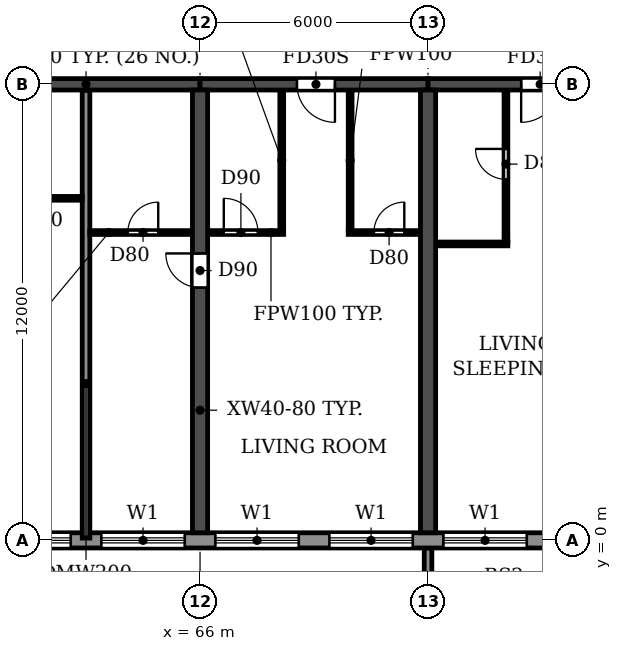
"""IFC4 building model, lengths in metres.
Left out: names, types, materials, properties, quantities, classifications, styles, units other than length and angle.
Written with IfcOpenShell. Run it as: python <this file> out.ifc"""

import sys

from ifc_helpers import new_model, si_unit, direction, frame, frame_2d, origin, place, context, subcontext, project, spatial, polyline, rectangle, outline, extrude, source, transform, mapped, element, fill, save


model = new_model("IFC4")
c1 = context("Model", 3, precision=1e-05, world=origin(), true_north=direction((0.0, 1.0)))
c2 = subcontext(c1, "Body", "Model", "MODEL_VIEW")
j1 = project(units=[si_unit("LENGTHUNIT", "METRE"), si_unit("PLANEANGLEUNIT", "RADIAN")], contexts=[c1])
p1 = place(None, origin())
s1 = spatial("IfcSite", under=j1, at=p1, CompositionType="ELEMENT")
p2 = place(p1, origin())
s2 = spatial("IfcBuilding", under=s1, at=p2, CompositionType="ELEMENT")
p3 = place(p2, frame((0.0, 0.0, 63.0)))
s3 = spatial("IfcBuildingStorey", under=s2, at=p3, CompositionType="ELEMENT", Elevation=63.0)
p4 = place(p3, frame((66.0, 0.2, 0.0), z_axis=(0.0, 0.0, 1.0), x_axis=(0.0, 1.0, 0.0)))
e1 = element("IfcWall", 1, at=p4, inside=s3, PredefinedType="SHEAR", context=c2, shape_type="SweptSolid", body=[
    extrude(rectangle(XDim=11.65, YDim=0.4, at=frame_2d((5.825, 0.0))), origin(), (0.0, 0.0, 1.0), 2.95),
])
p5 = place(p4, frame((6.45, 0.0, 0.0)))
e2 = element("IfcOpeningElement", 2, at=p5, cuts=e1, PredefinedType="OPENING", context=c2, shape_type="SweptSolid", body=[
    extrude(rectangle(XDim=0.9, YDim=2.1, at=frame_2d((0.45, 1.05))), frame((0.0, 0.21, 0.0), z_axis=(0.0, -1.0, 0.0), x_axis=(1.0, 0.0, 0.0)), (0.0, 0.0, 1.0), 0.42),
])
p6 = place(p3, frame((72.0, 0.2, 0.0), z_axis=(0.0, 0.0, 1.0), x_axis=(0.0, 1.0, 0.0)))
e3 = element("IfcWall", 3, at=p6, inside=s3, PredefinedType="SHEAR", context=c2, shape_type="SweptSolid", body=[
    extrude(rectangle(XDim=11.65, YDim=0.4, at=frame_2d((5.825, 0.0))), origin(), (0.0, 0.0, 1.0), 2.95),
])
p7 = place(p3, frame((60.0, 12.0, 0.0), z_axis=(0.0, 0.0, 1.0), x_axis=(1.0, 0.0, 0.0)))
e4 = element("IfcWall", 4, at=p7, inside=s3, PredefinedType="SHEAR", context=c2, shape_type="SweptSolid", body=[
    extrude(rectangle(XDim=6.0, YDim=0.3, at=frame_2d((3.0, 0.0))), origin(), (0.0, 0.0, 1.0), 2.35),
])
p8 = place(p3, frame((66.0, 12.0, 0.0), z_axis=(0.0, 0.0, 1.0), x_axis=(1.0, 0.0, 0.0)))
e5 = element("IfcWall", 5, at=p8, inside=s3, PredefinedType="SHEAR", context=c2, shape_type="SweptSolid", body=[
    extrude(rectangle(XDim=6.0, YDim=0.3, at=frame_2d((3.0, 0.0))), origin(), (0.0, 0.0, 1.0), 2.35),
])
p9 = place(p8, frame((2.55, 0.0, 0.0)))
e6 = element("IfcOpeningElement", 6, at=p9, cuts=e5, PredefinedType="OPENING", context=c2, shape_type="SweptSolid", body=[
    extrude(rectangle(XDim=1.0, YDim=2.1, at=frame_2d((0.5, 1.05))), frame((0.0, 0.16, 0.0), z_axis=(0.0, -1.0, 0.0), x_axis=(1.0, 0.0, 0.0)), (0.0, 0.0, 1.0), 0.32),
])
p10 = place(p3, frame((72.0, 12.0, 0.0), z_axis=(0.0, 0.0, 1.0), x_axis=(1.0, 0.0, 0.0)))
e7 = element("IfcWall", 7, at=p10, inside=s3, PredefinedType="SHEAR", context=c2, shape_type="SweptSolid", body=[
    extrude(rectangle(XDim=6.0, YDim=0.3, at=frame_2d((3.0, 0.0))), origin(), (0.0, 0.0, 1.0), 2.35),
])
p11 = place(p10, frame((2.45, 0.0, 0.0)))
e8 = element("IfcOpeningElement", 8, at=p11, cuts=e7, PredefinedType="OPENING", context=c2, shape_type="SweptSolid", body=[
    extrude(rectangle(XDim=1.0, YDim=2.1, at=frame_2d((0.5, 1.05))), frame((0.0, 0.16, 0.0), z_axis=(0.0, -1.0, 0.0), x_axis=(1.0, 0.0, 0.0)), (0.0, 0.0, 1.0), 0.32),
])
p12 = place(p3, frame((10.683, 0.0, 0.0), z_axis=(0.0, 0.0, 1.0), x_axis=(1.0, 0.0, 0.0)))
e9 = element("IfcWall", 9, at=p12, inside=s3, PredefinedType="STANDARD", context=c2, shape_type="SweptSolid", body=[
    extrude(rectangle(XDim=80.634, YDim=0.4, at=frame_2d((40.317, 0.0))), origin(), (0.0, 0.0, 1.0), 2.95),
])
p13 = place(p12, frame((1.717, 0.0, 0.9)))
e10 = element("IfcOpeningElement", 10, at=p13, cuts=e9, PredefinedType="OPENING", context=c2, shape_type="SweptSolid", body=[
    extrude(rectangle(XDim=2.2, YDim=1.5, at=frame_2d((1.1, 0.75))), frame((0.0, 0.21, 0.0), z_axis=(0.0, -1.0, 0.0), x_axis=(1.0, 0.0, 0.0)), (0.0, 0.0, 1.0), 0.42),
])
p14 = place(p12, frame((4.917, 0.0, 0.0)))
e11 = element("IfcOpeningElement", 11, at=p14, cuts=e9, PredefinedType="OPENING", context=c2, shape_type="SweptSolid", body=[
    extrude(rectangle(XDim=1.8, YDim=2.4, at=frame_2d((0.9, 1.2))), frame((0.0, 0.21, 0.0), z_axis=(0.0, -1.0, 0.0), x_axis=(1.0, 0.0, 0.0)), (0.0, 0.0, 1.0), 0.42),
])
p15 = place(p12, frame((7.717, 0.0, 0.9)))
e12 = element("IfcOpeningElement", 12, at=p15, cuts=e9, PredefinedType="OPENING", context=c2, shape_type="SweptSolid", body=[
    extrude(rectangle(XDim=2.2, YDim=1.5, at=frame_2d((1.1, 0.75))), frame((0.0, 0.21, 0.0), z_axis=(0.0, -1.0, 0.0), x_axis=(1.0, 0.0, 0.0)), (0.0, 0.0, 1.0), 0.42),
])
p16 = place(p12, frame((10.717, 0.0, 0.9)))
e13 = element("IfcOpeningElement", 13, at=p16, cuts=e9, PredefinedType="OPENING", context=c2, shape_type="SweptSolid", body=[
    extrude(rectangle(XDim=2.2, YDim=1.5, at=frame_2d((1.1, 0.75))), frame((0.0, 0.21, 0.0), z_axis=(0.0, -1.0, 0.0), x_axis=(1.0, 0.0, 0.0)), (0.0, 0.0, 1.0), 0.42),
])
p17 = place(p12, frame((13.717, 0.0, 0.9)))
e14 = element("IfcOpeningElement", 14, at=p17, cuts=e9, PredefinedType="OPENING", context=c2, shape_type="SweptSolid", body=[
    extrude(rectangle(XDim=2.2, YDim=1.5, at=frame_2d((1.1, 0.75))), frame((0.0, 0.21, 0.0), z_axis=(0.0, -1.0, 0.0), x_axis=(1.0, 0.0, 0.0)), (0.0, 0.0, 1.0), 0.42),
])
p18 = place(p12, frame((16.917, 0.0, 0.0)))
e15 = element("IfcOpeningElement", 15, at=p18, cuts=e9, PredefinedType="OPENING", context=c2, shape_type="SweptSolid", body=[
    extrude(rectangle(XDim=1.8, YDim=2.4, at=frame_2d((0.9, 1.2))), frame((0.0, 0.21, 0.0), z_axis=(0.0, -1.0, 0.0), x_axis=(1.0, 0.0, 0.0)), (0.0, 0.0, 1.0), 0.42),
])
p19 = place(p12, frame((19.717, 0.0, 0.9)))
e16 = element("IfcOpeningElement", 16, at=p19, cuts=e9, PredefinedType="OPENING", context=c2, shape_type="SweptSolid", body=[
    extrude(rectangle(XDim=2.2, YDim=1.5, at=frame_2d((1.1, 0.75))), frame((0.0, 0.21, 0.0), z_axis=(0.0, -1.0, 0.0), x_axis=(1.0, 0.0, 0.0)), (0.0, 0.0, 1.0), 0.42),
])
p20 = place(p12, frame((22.717, 0.0, 0.9)))
e17 = element("IfcOpeningElement", 17, at=p20, cuts=e9, PredefinedType="OPENING", context=c2, shape_type="SweptSolid", body=[
    extrude(rectangle(XDim=2.2, YDim=1.5, at=frame_2d((1.1, 0.75))), frame((0.0, 0.21, 0.0), z_axis=(0.0, -1.0, 0.0), x_axis=(1.0, 0.0, 0.0)), (0.0, 0.0, 1.0), 0.42),
])
p21 = place(p12, frame((25.917, 0.0, 0.0)))
e18 = element("IfcOpeningElement", 18, at=p21, cuts=e9, PredefinedType="OPENING", context=c2, shape_type="SweptSolid", body=[
    extrude(rectangle(XDim=1.8, YDim=2.4, at=frame_2d((0.9, 1.2))), frame((0.0, 0.21, 0.0), z_axis=(0.0, -1.0, 0.0), x_axis=(1.0, 0.0, 0.0)), (0.0, 0.0, 1.0), 0.42),
])
p22 = place(p12, frame((28.717, 0.0, 0.9)))
e19 = element("IfcOpeningElement", 19, at=p22, cuts=e9, PredefinedType="OPENING", context=c2, shape_type="SweptSolid", body=[
    extrude(rectangle(XDim=2.2, YDim=1.5, at=frame_2d((1.1, 0.75))), frame((0.0, 0.21, 0.0), z_axis=(0.0, -1.0, 0.0), x_axis=(1.0, 0.0, 0.0)), (0.0, 0.0, 1.0), 0.42),
])
p23 = place(p12, frame((31.717, 0.0, 0.9)))
e20 = element("IfcOpeningElement", 20, at=p23, cuts=e9, PredefinedType="OPENING", context=c2, shape_type="SweptSolid", body=[
    extrude(rectangle(XDim=2.2, YDim=1.5, at=frame_2d((1.1, 0.75))), frame((0.0, 0.21, 0.0), z_axis=(0.0, -1.0, 0.0), x_axis=(1.0, 0.0, 0.0)), (0.0, 0.0, 1.0), 0.42),
])
p24 = place(p12, frame((34.717, 0.0, 0.9)))
e21 = element("IfcOpeningElement", 21, at=p24, cuts=e9, PredefinedType="OPENING", context=c2, shape_type="SweptSolid", body=[
    extrude(rectangle(XDim=2.2, YDim=1.5, at=frame_2d((1.1, 0.75))), frame((0.0, 0.21, 0.0), z_axis=(0.0, -1.0, 0.0), x_axis=(1.0, 0.0, 0.0)), (0.0, 0.0, 1.0), 0.42),
])
p25 = place(p12, frame((37.717, 0.0, 0.9)))
e22 = element("IfcOpeningElement", 22, at=p25, cuts=e9, PredefinedType="OPENING", context=c2, shape_type="SweptSolid", body=[
    extrude(rectangle(XDim=2.2, YDim=1.5, at=frame_2d((1.1, 0.75))), frame((0.0, 0.21, 0.0), z_axis=(0.0, -1.0, 0.0), x_axis=(1.0, 0.0, 0.0)), (0.0, 0.0, 1.0), 0.42),
])
p26 = place(p12, frame((40.917, 0.0, 0.0)))
e23 = element("IfcOpeningElement", 23, at=p26, cuts=e9, PredefinedType="OPENING", context=c2, shape_type="SweptSolid", body=[
    extrude(rectangle(XDim=1.8, YDim=2.4, at=frame_2d((0.9, 1.2))), frame((0.0, 0.21, 0.0), z_axis=(0.0, -1.0, 0.0), x_axis=(1.0, 0.0, 0.0)), (0.0, 0.0, 1.0), 0.42),
])
p27 = place(p12, frame((43.717, 0.0, 0.9)))
e24 = element("IfcOpeningElement", 24, at=p27, cuts=e9, PredefinedType="OPENING", context=c2, shape_type="SweptSolid", body=[
    extrude(rectangle(XDim=2.2, YDim=1.5, at=frame_2d((1.1, 0.75))), frame((0.0, 0.21, 0.0), z_axis=(0.0, -1.0, 0.0), x_axis=(1.0, 0.0, 0.0)), (0.0, 0.0, 1.0), 0.42),
])
p28 = place(p12, frame((46.717, 0.0, 0.9)))
e25 = element("IfcOpeningElement", 25, at=p28, cuts=e9, PredefinedType="OPENING", context=c2, shape_type="SweptSolid", body=[
    extrude(rectangle(XDim=2.2, YDim=1.5, at=frame_2d((1.1, 0.75))), frame((0.0, 0.21, 0.0), z_axis=(0.0, -1.0, 0.0), x_axis=(1.0, 0.0, 0.0)), (0.0, 0.0, 1.0), 0.42),
])
p29 = place(p12, frame((49.717, 0.0, 0.9)))
e26 = element("IfcOpeningElement", 26, at=p29, cuts=e9, PredefinedType="OPENING", context=c2, shape_type="SweptSolid", body=[
    extrude(rectangle(XDim=2.2, YDim=1.5, at=frame_2d((1.1, 0.75))), frame((0.0, 0.21, 0.0), z_axis=(0.0, -1.0, 0.0), x_axis=(1.0, 0.0, 0.0)), (0.0, 0.0, 1.0), 0.42),
])
p30 = place(p12, frame((52.717, 0.0, 0.9)))
e27 = element("IfcOpeningElement", 27, at=p30, cuts=e9, PredefinedType="OPENING", context=c2, shape_type="SweptSolid", body=[
    extrude(rectangle(XDim=2.2, YDim=1.5, at=frame_2d((1.1, 0.75))), frame((0.0, 0.21, 0.0), z_axis=(0.0, -1.0, 0.0), x_axis=(1.0, 0.0, 0.0)), (0.0, 0.0, 1.0), 0.42),
])
p31 = place(p12, frame((55.717, 0.0, 0.9)))
e28 = element("IfcOpeningElement", 28, at=p31, cuts=e9, PredefinedType="OPENING", context=c2, shape_type="SweptSolid", body=[
    extrude(rectangle(XDim=2.2, YDim=1.5, at=frame_2d((1.1, 0.75))), frame((0.0, 0.21, 0.0), z_axis=(0.0, -1.0, 0.0), x_axis=(1.0, 0.0, 0.0)), (0.0, 0.0, 1.0), 0.42),
])
p32 = place(p12, frame((58.717, 0.0, 0.9)))
e29 = element("IfcOpeningElement", 29, at=p32, cuts=e9, PredefinedType="OPENING", context=c2, shape_type="SweptSolid", body=[
    extrude(rectangle(XDim=2.2, YDim=1.5, at=frame_2d((1.1, 0.75))), frame((0.0, 0.21, 0.0), z_axis=(0.0, -1.0, 0.0), x_axis=(1.0, 0.0, 0.0)), (0.0, 0.0, 1.0), 0.42),
])
p33 = place(p12, frame((61.717, 0.0, 0.9)))
e30 = element("IfcOpeningElement", 30, at=p33, cuts=e9, PredefinedType="OPENING", context=c2, shape_type="SweptSolid", body=[
    extrude(rectangle(XDim=2.2, YDim=1.5, at=frame_2d((1.1, 0.75))), frame((0.0, 0.21, 0.0), z_axis=(0.0, -1.0, 0.0), x_axis=(1.0, 0.0, 0.0)), (0.0, 0.0, 1.0), 0.42),
])
p34 = place(p12, frame((64.917, 0.0, 0.0)))
e31 = element("IfcOpeningElement", 31, at=p34, cuts=e9, PredefinedType="OPENING", context=c2, shape_type="SweptSolid", body=[
    extrude(rectangle(XDim=1.8, YDim=2.4, at=frame_2d((0.9, 1.2))), frame((0.0, 0.21, 0.0), z_axis=(0.0, -1.0, 0.0), x_axis=(1.0, 0.0, 0.0)), (0.0, 0.0, 1.0), 0.42),
])
p35 = place(p12, frame((67.717, 0.0, 0.9)))
e32 = element("IfcOpeningElement", 32, at=p35, cuts=e9, PredefinedType="OPENING", context=c2, shape_type="SweptSolid", body=[
    extrude(rectangle(XDim=2.2, YDim=1.5, at=frame_2d((1.1, 0.75))), frame((0.0, 0.21, 0.0), z_axis=(0.0, -1.0, 0.0), x_axis=(1.0, 0.0, 0.0)), (0.0, 0.0, 1.0), 0.42),
])
p36 = place(p12, frame((70.717, 0.0, 0.9)))
e33 = element("IfcOpeningElement", 33, at=p36, cuts=e9, PredefinedType="OPENING", context=c2, shape_type="SweptSolid", body=[
    extrude(rectangle(XDim=2.2, YDim=1.5, at=frame_2d((1.1, 0.75))), frame((0.0, 0.21, 0.0), z_axis=(0.0, -1.0, 0.0), x_axis=(1.0, 0.0, 0.0)), (0.0, 0.0, 1.0), 0.42),
])
p37 = place(p12, frame((73.717, 0.0, 0.9)))
e34 = element("IfcOpeningElement", 34, at=p37, cuts=e9, PredefinedType="OPENING", context=c2, shape_type="SweptSolid", body=[
    extrude(rectangle(XDim=2.2, YDim=1.5, at=frame_2d((1.1, 0.75))), frame((0.0, 0.21, 0.0), z_axis=(0.0, -1.0, 0.0), x_axis=(1.0, 0.0, 0.0)), (0.0, 0.0, 1.0), 0.42),
])
p38 = place(p12, frame((76.917, 0.0, 0.0)))
e35 = element("IfcOpeningElement", 35, at=p38, cuts=e9, PredefinedType="OPENING", context=c2, shape_type="SweptSolid", body=[
    extrude(rectangle(XDim=1.8, YDim=2.4, at=frame_2d((0.9, 1.2))), frame((0.0, 0.21, 0.0), z_axis=(0.0, -1.0, 0.0), x_axis=(1.0, 0.0, 0.0)), (0.0, 0.0, 1.0), 0.42),
])
m1 = source(origin(), c2, "Body", "SweptSolid", [
    extrude(outline(polyline([(0.0, 0.0), (0.2, 0.0), (0.2, 1.65), (0.0, 1.65), (0.0, 0.0)])), origin(), (0.0, 0.0, 1.0), 3.1),
])
p39 = place(p3, frame((71.9, -1.85, 0.0)))
e36 = element("IfcWall", 36, at=p39, inside=s3, PredefinedType="STANDARD", context=c2, shape_type="MappedRepresentation", body=[
    mapped(m1, transform((0.0, 0.0, 0.0))),
])
p40 = place(p3, frame((63.0, 0.06, 0.0), z_axis=(0.0, 0.0, 1.0), x_axis=(0.0, 1.0, 0.0)))
e37 = element("IfcWall", 37, at=p40, inside=s3, PredefinedType="PARTITIONING", context=c2, shape_type="SweptSolid", body=[
    extrude(rectangle(XDim=11.78, YDim=0.2, at=frame_2d((5.89, 0.0))), origin(), (0.0, 0.0, 1.0), 2.95),
])
p41 = place(p3, frame((72.21, 7.8, 0.0), z_axis=(0.0, 0.0, 1.0), x_axis=(1.0, 0.0, 0.0)))
e38 = element("IfcWall", 38, at=p41, inside=s3, PredefinedType="PARTITIONING", context=c2, shape_type="SweptSolid", body=[
    extrude(rectangle(XDim=1.89, YDim=0.1, at=frame_2d((0.945, 0.0))), origin(), (0.0, 0.0, 1.0), 2.95),
])
p42 = place(p3, frame((63.1, 8.1, 0.0), z_axis=(0.0, 0.0, 1.0), x_axis=(1.0, 0.0, 0.0)))
e39 = element("IfcWall", 39, at=p42, inside=s3, PredefinedType="PARTITIONING", context=c2, shape_type="SweptSolid", body=[
    extrude(rectangle(XDim=2.69, YDim=0.1, at=frame_2d((1.345, 0.0))), origin(), (0.0, 0.0, 1.0), 2.95),
])
p43 = place(p42, frame((1.0, 0.0, 0.0)))
e40 = element("IfcOpeningElement", 40, at=p43, cuts=e39, PredefinedType="OPENING", context=c2, shape_type="SweptSolid", body=[
    extrude(rectangle(XDim=0.8, YDim=2.1, at=frame_2d((0.4, 1.05))), frame((0.0, 0.06, 0.0), z_axis=(0.0, -1.0, 0.0), x_axis=(1.0, 0.0, 0.0)), (0.0, 0.0, 1.0), 0.12),
])
p44 = place(p3, frame((66.21, 8.1, 0.0), z_axis=(0.0, 0.0, 1.0), x_axis=(1.0, 0.0, 0.0)))
e41 = element("IfcWall", 41, at=p44, inside=s3, PredefinedType="PARTITIONING", context=c2, shape_type="SweptSolid", body=[
    extrude(rectangle(XDim=1.99, YDim=0.1, at=frame_2d((0.995, 0.0))), origin(), (0.0, 0.0, 1.0), 2.95),
])
p45 = place(p44, frame((0.415, 0.0, 0.0)))
e42 = element("IfcOpeningElement", 42, at=p45, cuts=e41, PredefinedType="OPENING", context=c2, shape_type="SweptSolid", body=[
    extrude(rectangle(XDim=0.9, YDim=2.1, at=frame_2d((0.45, 1.05))), frame((0.0, 0.06, 0.0), z_axis=(0.0, -1.0, 0.0), x_axis=(1.0, 0.0, 0.0)), (0.0, 0.0, 1.0), 0.12),
])
p46 = place(p3, frame((69.9, 8.1, 0.0), z_axis=(0.0, 0.0, 1.0), x_axis=(1.0, 0.0, 0.0)))
e43 = element("IfcWall", 43, at=p46, inside=s3, PredefinedType="PARTITIONING", context=c2, shape_type="SweptSolid", body=[
    extrude(rectangle(XDim=1.89, YDim=0.1, at=frame_2d((0.945, 0.0))), origin(), (0.0, 0.0, 1.0), 2.95),
])
p47 = place(p46, frame((0.675, 0.0, 0.0)))
e44 = element("IfcOpeningElement", 44, at=p47, cuts=e43, PredefinedType="OPENING", context=c2, shape_type="SweptSolid", body=[
    extrude(rectangle(XDim=0.8, YDim=2.1, at=frame_2d((0.4, 1.05))), frame((0.0, 0.06, 0.0), z_axis=(0.0, -1.0, 0.0), x_axis=(1.0, 0.0, 0.0)), (0.0, 0.0, 1.0), 0.12),
])
p48 = place(p3, frame((60.21, 9.0, 0.0), z_axis=(0.0, 0.0, 1.0), x_axis=(1.0, 0.0, 0.0)))
e45 = element("IfcWall", 45, at=p48, inside=s3, PredefinedType="PARTITIONING", context=c2, shape_type="SweptSolid", body=[
    extrude(rectangle(XDim=2.69, YDim=0.1, at=frame_2d((1.345, 0.0))), origin(), (0.0, 0.0, 1.0), 2.95),
])
p49 = place(p48, frame((0.89, 0.0, 0.0)))
e46 = element("IfcOpeningElement", 46, at=p49, cuts=e45, PredefinedType="OPENING", context=c2, shape_type="SweptSolid", body=[
    extrude(rectangle(XDim=0.8, YDim=2.1, at=frame_2d((0.4, 1.05))), frame((0.0, 0.06, 0.0), z_axis=(0.0, -1.0, 0.0), x_axis=(1.0, 0.0, 0.0)), (0.0, 0.0, 1.0), 0.12),
])
for number, where, z_axis, x_axis in (
    (47, (68.15, 8.15, 0.0), (0.0, 0.0, 1.0), (0.0, 1.0, 0.0)),
    (48, (69.95, 8.15, 0.0), (0.0, 0.0, 1.0), (0.0, 1.0, 0.0)),
):
    element("IfcWall", number, at=place(p3, frame(where, z_axis=z_axis, x_axis=x_axis)), inside=s3, PredefinedType="PARTITIONING", context=c2, shape_type="SweptSolid", body=[
        extrude(rectangle(XDim=3.69, YDim=0.1, at=frame_2d((1.845, 0.0))), origin(), (0.0, 0.0, 1.0), 2.95),
    ])
p50 = place(p3, frame((74.05, 7.85, 0.0), z_axis=(0.0, 0.0, 1.0), x_axis=(0.0, 1.0, 0.0)))
e49 = element("IfcWall", 49, at=p50, inside=s3, PredefinedType="PARTITIONING", context=c2, shape_type="SweptSolid", body=[
    extrude(rectangle(XDim=3.99, YDim=0.1, at=frame_2d((1.995, 0.0))), origin(), (0.0, 0.0, 1.0), 2.95),
])
p51 = place(p50, frame((1.65, 0.0, 0.0)))
e50 = element("IfcOpeningElement", 50, at=p51, cuts=e49, PredefinedType="OPENING", context=c2, shape_type="SweptSolid", body=[
    extrude(rectangle(XDim=0.8, YDim=2.1, at=frame_2d((0.4, 1.05))), frame((0.0, 0.06, 0.0), z_axis=(0.0, -1.0, 0.0), x_axis=(1.0, 0.0, 0.0)), (0.0, 0.0, 1.0), 0.12),
])
p52 = place(p29, origin())
e51 = element("IfcWindow", 51, at=p52, inside=s3, PartitioningType="DOUBLE_PANEL_HORIZONTAL", PredefinedType="WINDOW", context=c2, shape_type="SweptSolid", body=[
    extrude(rectangle(XDim=2.2, YDim=1.5, at=frame_2d((1.1, 0.75))), frame((0.0, 0.03, 0.0), z_axis=(0.0, -1.0, 0.0), x_axis=(1.0, 0.0, 0.0)), (0.0, 0.0, 1.0), 0.06),
])
fill(e26, e51)
p53 = place(p30, origin())
e52 = element("IfcWindow", 52, at=p53, inside=s3, PartitioningType="DOUBLE_PANEL_HORIZONTAL", PredefinedType="WINDOW", context=c2, shape_type="SweptSolid", body=[
    extrude(rectangle(XDim=2.2, YDim=1.5, at=frame_2d((1.1, 0.75))), frame((0.0, 0.03, 0.0), z_axis=(0.0, -1.0, 0.0), x_axis=(1.0, 0.0, 0.0)), (0.0, 0.0, 1.0), 0.06),
])
fill(e27, e52)
p54 = place(p31, origin())
e53 = element("IfcWindow", 53, at=p54, inside=s3, PartitioningType="DOUBLE_PANEL_HORIZONTAL", PredefinedType="WINDOW", context=c2, shape_type="SweptSolid", body=[
    extrude(rectangle(XDim=2.2, YDim=1.5, at=frame_2d((1.1, 0.75))), frame((0.0, 0.03, 0.0), z_axis=(0.0, -1.0, 0.0), x_axis=(1.0, 0.0, 0.0)), (0.0, 0.0, 1.0), 0.06),
])
fill(e28, e53)
p55 = place(p32, origin())
e54 = element("IfcWindow", 54, at=p55, inside=s3, PartitioningType="DOUBLE_PANEL_HORIZONTAL", PredefinedType="WINDOW", context=c2, shape_type="SweptSolid", body=[
    extrude(rectangle(XDim=2.2, YDim=1.5, at=frame_2d((1.1, 0.75))), frame((0.0, 0.03, 0.0), z_axis=(0.0, -1.0, 0.0), x_axis=(1.0, 0.0, 0.0)), (0.0, 0.0, 1.0), 0.06),
])
fill(e29, e54)
p56 = place(p33, origin())
e55 = element("IfcWindow", 55, at=p56, inside=s3, PartitioningType="DOUBLE_PANEL_HORIZONTAL", PredefinedType="WINDOW", context=c2, shape_type="SweptSolid", body=[
    extrude(rectangle(XDim=2.2, YDim=1.5, at=frame_2d((1.1, 0.75))), frame((0.0, 0.03, 0.0), z_axis=(0.0, -1.0, 0.0), x_axis=(1.0, 0.0, 0.0)), (0.0, 0.0, 1.0), 0.06),
])
fill(e30, e55)
p57 = place(p43, origin())
e56 = element("IfcDoor", 56, at=p57, inside=s3, OperationType="SINGLE_SWING_RIGHT", PredefinedType="DOOR", context=c2, shape_type="SweptSolid", body=[
    extrude(rectangle(XDim=0.8, YDim=2.1, at=frame_2d((0.4, 1.05))), frame((0.0, 0.025, 0.0), z_axis=(0.0, -1.0, 0.0), x_axis=(1.0, 0.0, 0.0)), (0.0, 0.0, 1.0), 0.05),
])
fill(e40, e56)
p58 = place(p5, origin())
e57 = element("IfcDoor", 57, at=p58, inside=s3, OperationType="SINGLE_SWING_RIGHT", PredefinedType="DOOR", context=c2, shape_type="SweptSolid", body=[
    extrude(rectangle(XDim=0.9, YDim=2.1, at=frame_2d((0.45, 1.05))), frame((0.0, 0.025, 0.0), z_axis=(0.0, -1.0, 0.0), x_axis=(1.0, 0.0, 0.0)), (0.0, 0.0, 1.0), 0.05),
])
fill(e2, e57)
p59 = place(p45, origin())
e58 = element("IfcDoor", 58, at=p59, inside=s3, OperationType="SINGLE_SWING_LEFT", PredefinedType="DOOR", context=c2, shape_type="SweptSolid", body=[
    extrude(rectangle(XDim=0.9, YDim=2.1, at=frame_2d((0.45, 1.05))), frame((0.0, 0.025, 0.0), z_axis=(0.0, -1.0, 0.0), x_axis=(1.0, 0.0, 0.0)), (0.0, 0.0, 1.0), 0.05),
])
fill(e42, e58)
p60 = place(p9, frame((1.0, 0.0, 0.0), z_axis=(0.0, 0.0, 1.0), x_axis=(-1.0, 0.0, 0.0)))
e59 = element("IfcDoor", 59, at=p60, inside=s3, OperationType="SINGLE_SWING_LEFT", PredefinedType="DOOR", context=c2, shape_type="SweptSolid", body=[
    extrude(rectangle(XDim=1.0, YDim=2.1, at=frame_2d((0.5, 1.05))), frame((0.0, 0.025, 0.0), z_axis=(0.0, -1.0, 0.0), x_axis=(1.0, 0.0, 0.0)), (0.0, 0.0, 1.0), 0.05),
])
fill(e6, e59)
p61 = place(p47, origin())
e60 = element("IfcDoor", 60, at=p61, inside=s3, OperationType="SINGLE_SWING_RIGHT", PredefinedType="DOOR", context=c2, shape_type="SweptSolid", body=[
    extrude(rectangle(XDim=0.8, YDim=2.1, at=frame_2d((0.4, 1.05))), frame((0.0, 0.025, 0.0), z_axis=(0.0, -1.0, 0.0), x_axis=(1.0, 0.0, 0.0)), (0.0, 0.0, 1.0), 0.05),
])
fill(e44, e60)
p62 = place(p51, origin())
e61 = element("IfcDoor", 61, at=p62, inside=s3, OperationType="SINGLE_SWING_RIGHT", PredefinedType="DOOR", context=c2, shape_type="SweptSolid", body=[
    extrude(rectangle(XDim=0.8, YDim=2.1, at=frame_2d((0.4, 1.05))), frame((0.0, 0.025, 0.0), z_axis=(0.0, -1.0, 0.0), x_axis=(1.0, 0.0, 0.0)), (0.0, 0.0, 1.0), 0.05),
])
fill(e50, e61)
p63 = place(p11, frame((1.0, 0.0, 0.0), z_axis=(0.0, 0.0, 1.0), x_axis=(-1.0, 0.0, 0.0)))
e62 = element("IfcDoor", 62, at=p63, inside=s3, OperationType="SINGLE_SWING_RIGHT", PredefinedType="DOOR", context=c2, shape_type="SweptSolid", body=[
    extrude(rectangle(XDim=1.0, YDim=2.1, at=frame_2d((0.5, 1.05))), frame((0.0, 0.025, 0.0), z_axis=(0.0, -1.0, 0.0), x_axis=(1.0, 0.0, 0.0)), (0.0, 0.0, 1.0), 0.05),
])
fill(e8, e62)
save(model, sys.argv[1])
